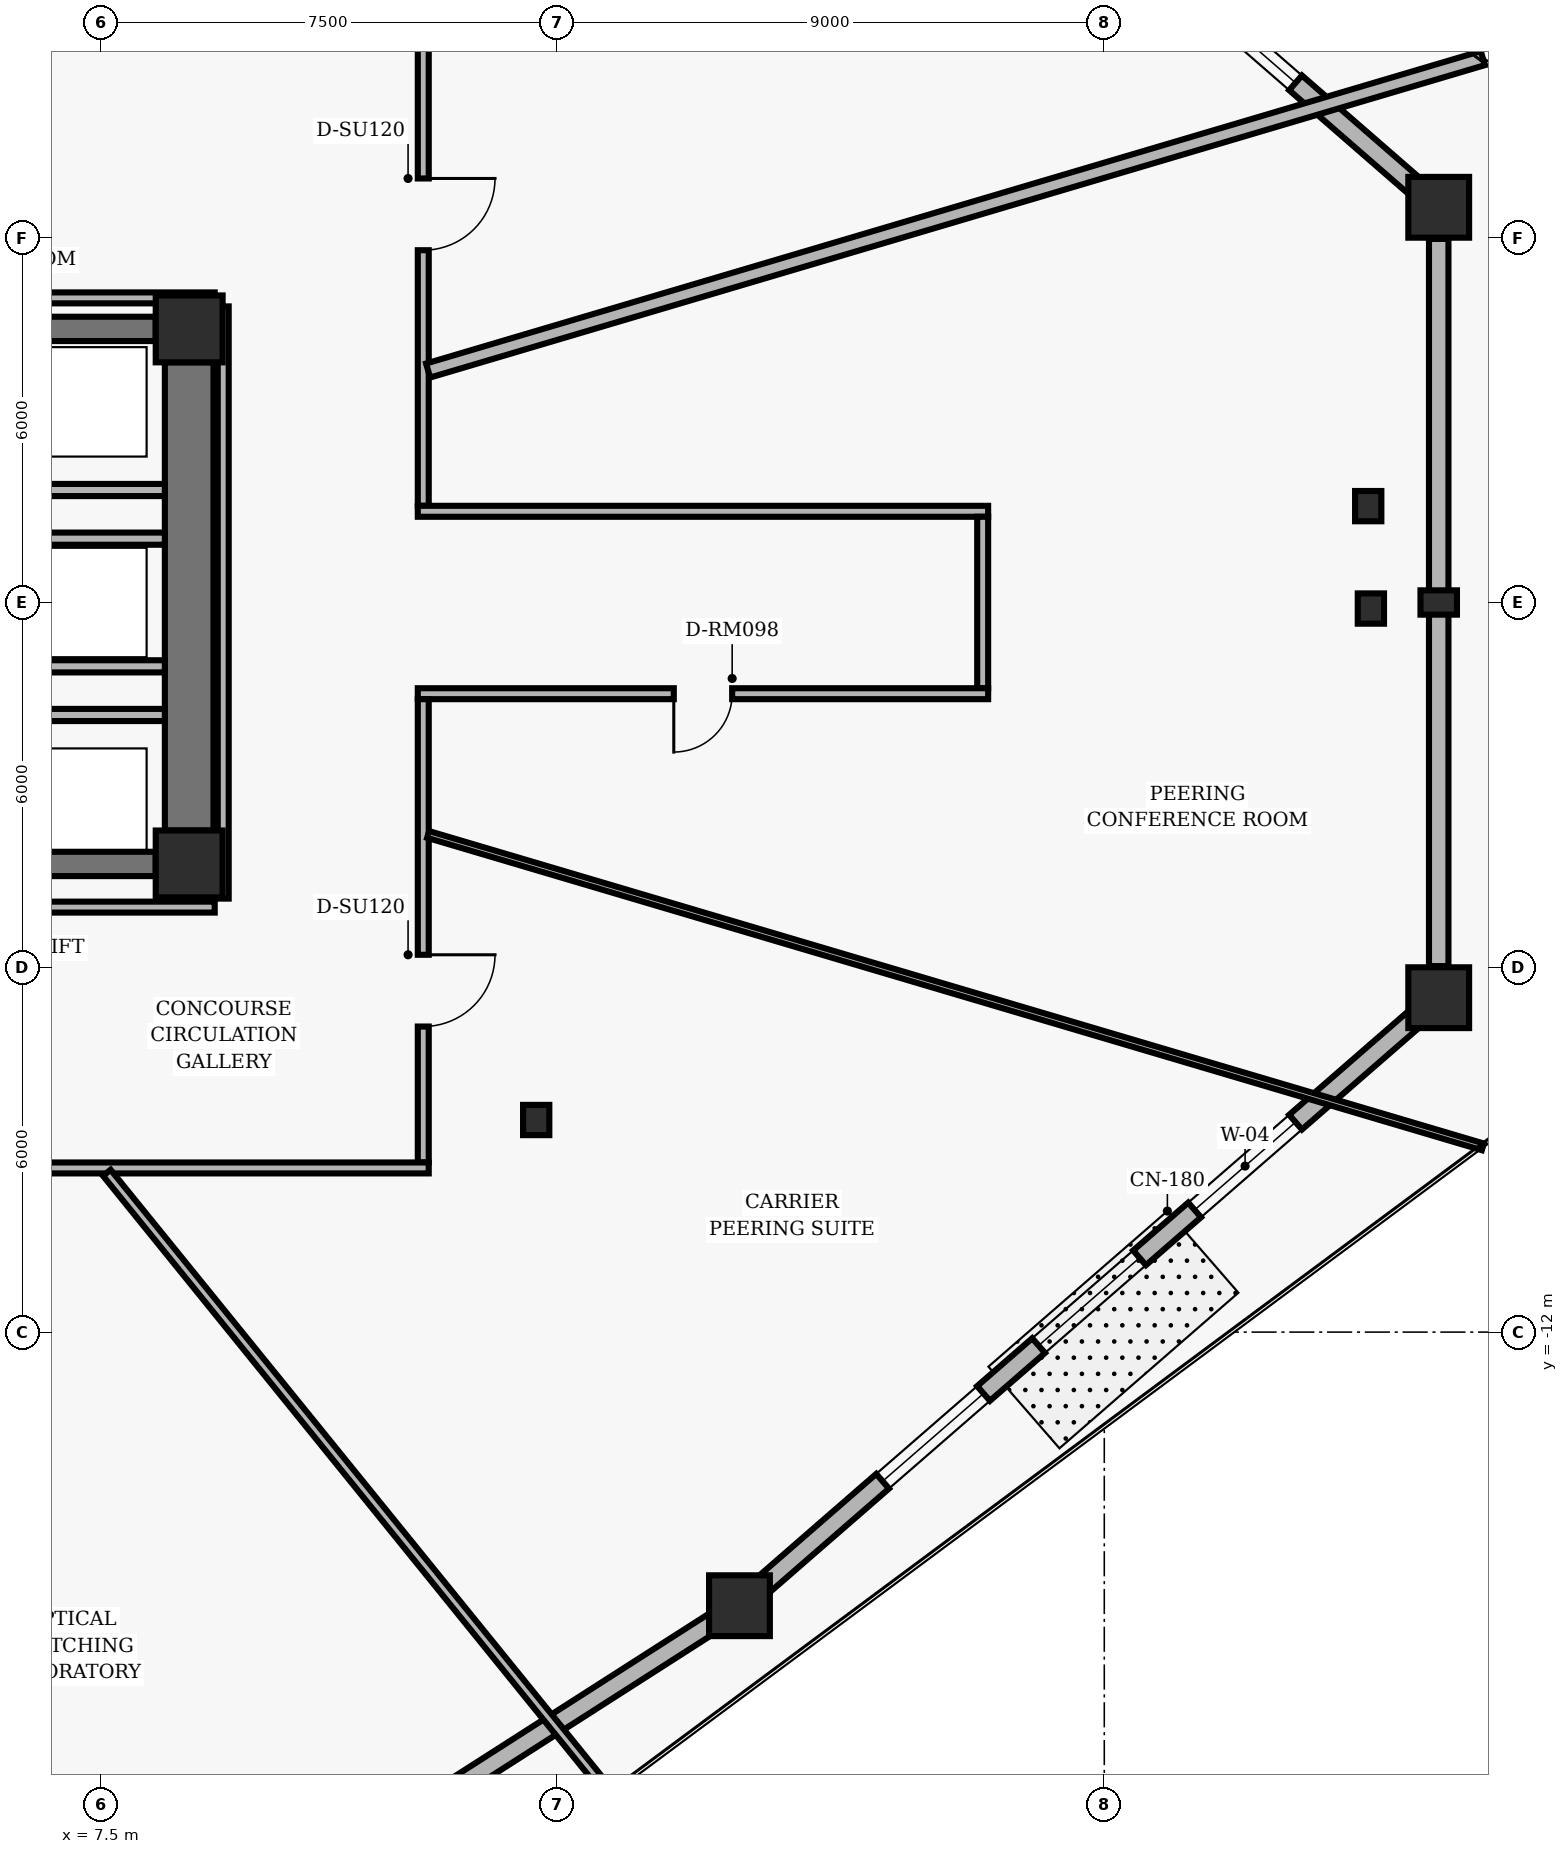
"""IFC4 building model, lengths in metres.
Left out: names, types, materials, properties, quantities, classifications, styles, units other than length and angle.
Written with IfcOpenShell. Run it as: python <this file> out.ifc"""

import sys

from ifc_helpers import new_model, si_unit, direction, frame, frame_2d, origin, origin_2d, place, context, subcontext, project, spatial, rectangle, hollow_rectangle, i_section, extrude, element, fill, save


model = new_model("IFC4")
c1 = context("Model", 3, precision=1e-05, world=origin(), true_north=direction((0.0, 1.0)))
c2 = subcontext(c1, "Body", "Model", "MODEL_VIEW")
j1 = project(units=[si_unit("LENGTHUNIT", "METRE"), si_unit("PLANEANGLEUNIT", "RADIAN")], contexts=[c1])
p1 = place(None, origin())
s1 = spatial("IfcSite", under=j1, at=p1, CompositionType="ELEMENT")
p2 = place(p1, origin())
s2 = spatial("IfcBuilding", under=s1, at=p2, CompositionType="ELEMENT")
p3 = place(p2, frame((0.0, 0.0, 4.8)))
s3 = spatial("IfcBuildingStorey", under=s2, at=p3, CompositionType="ELEMENT", Elevation=4.8)
for number, where, z_axis, x_axis in (
    (1, (8.95, 4.5, 0.0), (0.0, 0.0, 1.0), (1.0, 0.0, 0.0)),
    (2, (8.95, -4.3, 0.0), (0.0, 0.0, 1.0), (1.0, 0.0, 0.0)),
):
    element("IfcColumn", number, at=place(p3, frame(where, z_axis=z_axis, x_axis=x_axis)), inside=s3, PredefinedType="COLUMN", context=c2, shape_type="SweptSolid", body=[
        extrude(hollow_rectangle(XDim=1.1, YDim=1.1, WallThickness=0.07, InnerFilletRadius=0.02, OuterFilletRadius=0.04, at=origin_2d()), origin(), (0.0, 0.0, 1.0), 3.52),
    ])
p4 = place(p3, frame((8.95, -3.75, 0.0), z_axis=(0.0, 0.0, 1.0), x_axis=(0.0, 1.0, 0.0)))
e3 = element("IfcWall", 3, at=p4, inside=s3, PredefinedType="SHEAR", context=c2, shape_type="SweptSolid", body=[
    extrude(rectangle(XDim=7.7, YDim=0.8, at=frame_2d((3.85, 0.0))), origin(), (0.0, 0.0, 1.0), 3.218),
])
for number, where, z_axis, x_axis in (
    (4, (6.6, 4.5, 0.0), (0.0, 0.0, 1.0), (1.0, 0.0, 0.0)),
    (5, (6.6, -4.3, 0.0), (0.0, 0.0, 1.0), (1.0, 0.0, 0.0)),
):
    element("IfcWall", number, at=place(p3, frame(where, z_axis=z_axis, x_axis=x_axis)), inside=s3, PredefinedType="SHEAR", context=c2, shape_type="SweptSolid", body=[
        extrude(rectangle(XDim=1.8, YDim=0.4, at=frame_2d((0.9, 0.0))), origin(), (0.0, 0.0, 1.0), 3.218),
    ])
for number, where, z_axis, x_axis in (
    (6, (18.0, -16.5, 0.0), (0.0, 0.0, 1.0), (1.0, 0.0, 0.0)),
    (7, (29.5, -6.5, 0.0), (0.0, 0.0, 1.0), (1.0, 0.0, 0.0)),
    (8, (29.5, 6.5, 0.0), (0.0, 0.0, 1.0), (1.0, 0.0, 0.0)),
):
    element("IfcColumn", number, at=place(p3, frame(where, z_axis=z_axis, x_axis=x_axis)), inside=s3, PredefinedType="COLUMN", context=c2, shape_type="SweptSolid", body=[
        extrude(rectangle(XDim=1.0, YDim=1.0, at=origin_2d()), origin(), (0.0, 0.0, 1.0), 3.52),
    ])
for number, where, z_axis, x_axis in (
    (9, (28.341, 1.585, 0.0), (0.0, 0.0, 1.0), (1.0, 0.0, 0.0)),
    (10, (14.657, -8.512, 0.0), (0.0, 0.0, 1.0), (1.0, 0.0, 0.0)),
    (11, (28.385, -0.1, 0.0), (0.0, 0.0, 1.0), (1.0, 0.0, 0.0)),
):
    element("IfcColumn", number, at=place(p3, frame(where, z_axis=z_axis, x_axis=x_axis)), inside=s3, PredefinedType="COLUMN", context=c2, shape_type="SweptSolid", body=[
        extrude(i_section(OverallWidth=0.432, OverallDepth=0.498, WebThickness=0.056, FlangeThickness=0.089, FilletRadius=0.025, at=origin_2d()), origin(), (0.0, 0.0, 1.0), 3.52),
    ])
p5 = place(p3, frame((29.5, 0.0, 0.0), z_axis=(0.0, 0.0, 1.0), x_axis=(1.0, 0.0, 0.0)))
e12 = element("IfcColumn", 12, at=p5, inside=s3, PredefinedType="PILASTER", context=c2, shape_type="SweptSolid", body=[
    extrude(rectangle(XDim=0.6, YDim=0.4, at=origin_2d()), origin(), (0.0, 0.0, 1.0), 3.52),
])
p6 = place(p3, frame((17.562, -16.78, 0.0), z_axis=(0.0, 0.0, 1.0), x_axis=(-0.842268830443, -0.539057712368, 0.0)))
e13 = element("IfcWall", 13, at=p6, inside=s3, PredefinedType="SOLIDWALL", context=c2, shape_type="SweptSolid", body=[
    extrude(rectangle(XDim=13.801, YDim=0.32, at=frame_2d((6.9, 0.0))), origin(), (0.0, 0.0, 1.0), 2.588),
])
p7 = place(p3, frame((29.108, -6.841, 0.0), z_axis=(0.0, 0.0, 1.0), x_axis=(-0.754615886195, -0.656166796098, 0.0)))
e14 = element("IfcWall", 14, at=p7, inside=s3, PredefinedType="SOLIDWALL", context=c2, shape_type="SweptSolid", body=[
    extrude(rectangle(XDim=14.2, YDim=0.32, at=frame_2d((7.1, 0.0))), origin(), (0.0, 0.0, 1.0), 2.261),
])
p8 = place(p7, frame((2.6, 0.0, 0.4)))
e15 = element("IfcOpeningElement", 15, at=p8, cuts=e14, PredefinedType="OPENING", context=c2, shape_type="SweptSolid", body=[
    extrude(rectangle(XDim=2.2, YDim=1.1, at=frame_2d((1.1, 0.55))), frame((0.0, 0.17, 0.0), z_axis=(0.0, -1.0, 0.0), x_axis=(1.0, 0.0, 0.0)), (0.0, 0.0, 1.0), 0.34),
])
p9 = place(p7, frame((6.0, 0.0, 0.4)))
e16 = element("IfcOpeningElement", 16, at=p9, cuts=e14, PredefinedType="OPENING", context=c2, shape_type="SweptSolid", body=[
    extrude(rectangle(XDim=2.2, YDim=1.1, at=frame_2d((1.1, 0.55))), frame((0.0, 0.17, 0.0), z_axis=(0.0, -1.0, 0.0), x_axis=(1.0, 0.0, 0.0)), (0.0, 0.0, 1.0), 0.34),
])
p10 = place(p7, frame((9.4, 0.0, 0.4)))
e17 = element("IfcOpeningElement", 17, at=p10, cuts=e14, PredefinedType="OPENING", context=c2, shape_type="SweptSolid", body=[
    extrude(rectangle(XDim=2.2, YDim=1.1, at=frame_2d((1.1, 0.55))), frame((0.0, 0.17, 0.0), z_axis=(0.0, -1.0, 0.0), x_axis=(1.0, 0.0, 0.0)), (0.0, 0.0, 1.0), 0.34),
])
p11 = place(p3, frame((29.5, 5.98, 0.0), z_axis=(0.0, 0.0, 1.0), x_axis=(0.0, -1.0, 0.0)))
e18 = element("IfcWall", 18, at=p11, inside=s3, PredefinedType="SOLIDWALL", context=c2, shape_type="SweptSolid", body=[
    extrude(rectangle(XDim=11.96, YDim=0.32, at=frame_2d((5.98, 0.0))), origin(), (0.0, 0.0, 1.0), 2.588),
])
p12 = place(p3, frame((18.392, 16.159, 0.0), z_axis=(0.0, 0.0, 1.0), x_axis=(0.754615886195, -0.656166796098, 0.0)))
e19 = element("IfcWall", 19, at=p12, inside=s3, PredefinedType="SOLIDWALL", context=c2, shape_type="SweptSolid", body=[
    extrude(rectangle(XDim=14.2, YDim=0.32, at=frame_2d((7.1, 0.0))), origin(), (0.0, 0.0, 1.0), 2.261),
])
p13 = place(p12, frame((2.6, 0.0, 0.4)))
e20 = element("IfcOpeningElement", 20, at=p13, cuts=e19, PredefinedType="OPENING", context=c2, shape_type="SweptSolid", body=[
    extrude(rectangle(XDim=2.2, YDim=1.1, at=frame_2d((1.1, 0.55))), frame((0.0, 0.17, 0.0), z_axis=(0.0, -1.0, 0.0), x_axis=(1.0, 0.0, 0.0)), (0.0, 0.0, 1.0), 0.34),
])
p14 = place(p12, frame((9.4, 0.0, 0.4)))
e21 = element("IfcOpeningElement", 21, at=p14, cuts=e19, PredefinedType="OPENING", context=c2, shape_type="SweptSolid", body=[
    extrude(rectangle(XDim=2.2, YDim=1.1, at=frame_2d((1.1, 0.55))), frame((0.0, 0.17, 0.0), z_axis=(0.0, -1.0, 0.0), x_axis=(1.0, 0.0, 0.0)), (0.0, 0.0, 1.0), 0.34),
])
for number, where, z_axis, x_axis in (
    (22, (6.45, -1.85, 0.0), (0.0, 0.0, 1.0), (1.0, 0.0, 0.0)),
    (23, (6.45, 1.85, 0.0), (0.0, 0.0, 1.0), (1.0, 0.0, 0.0)),
):
    element("IfcWall", number, at=place(p3, frame(where, z_axis=z_axis, x_axis=x_axis)), inside=s3, PredefinedType="PARTITIONING", context=c2, shape_type="SweptSolid", body=[
        extrude(rectangle(XDim=2.1, YDim=0.2, at=frame_2d((1.05, 0.0))), origin(), (0.0, 0.0, 1.0), 3.193),
    ])
for number, where, z_axis, x_axis in (
    (24, (6.64, -1.05, 0.0), (0.0, 0.0, 1.0), (1.0, 0.0, 0.0)),
    (25, (6.64, 1.05, 0.0), (0.0, 0.0, 1.0), (1.0, 0.0, 0.0)),
):
    element("IfcWall", number, at=place(p3, frame(where, z_axis=z_axis, x_axis=x_axis)), inside=s3, PredefinedType="PARTITIONING", context=c2, shape_type="SweptSolid", body=[
        extrude(rectangle(XDim=1.91, YDim=0.2, at=frame_2d((0.955, 0.0))), origin(), (0.0, 0.0, 1.0), 3.193),
    ])
p15 = place(p3, frame((12.8, 9.21, 0.0), z_axis=(0.0, 0.0, 1.0), x_axis=(0.0, -1.0, 0.0)))
e26 = element("IfcWall", 26, at=p15, inside=s3, PredefinedType="PARTITIONING", context=c2, shape_type="SweptSolid", body=[
    extrude(rectangle(XDim=7.62, YDim=0.18, at=frame_2d((3.81, 0.0))), origin(), (0.0, 0.0, 1.0), 3.193),
])
p16 = place(p15, frame((2.236, 0.0, 0.0)))
e27 = element("IfcOpeningElement", 27, at=p16, cuts=e26, PredefinedType="OPENING", context=c2, shape_type="SweptSolid", body=[
    extrude(rectangle(XDim=1.18, YDim=2.02, at=frame_2d((0.59, 1.01))), frame((0.0, 0.1, 0.0), z_axis=(0.0, -1.0, 0.0), x_axis=(1.0, 0.0, 0.0)), (0.0, 0.0, 1.0), 0.2),
])
p17 = place(p3, frame((12.71, 1.5, 0.0), z_axis=(0.0, 0.0, 1.0), x_axis=(1.0, 0.0, 0.0)))
e28 = element("IfcWall", 28, at=p17, inside=s3, PredefinedType="PARTITIONING", context=c2, shape_type="SweptSolid", body=[
    extrude(rectangle(XDim=9.38, YDim=0.18, at=frame_2d((4.69, 0.0))), origin(), (0.0, 0.0, 1.0), 3.193),
])
p18 = place(p3, frame((22.0, 1.41, 0.0), z_axis=(0.0, 0.0, 1.0), x_axis=(0.0, -1.0, 0.0)))
e29 = element("IfcWall", 29, at=p18, inside=s3, PredefinedType="PARTITIONING", context=c2, shape_type="SweptSolid", body=[
    extrude(rectangle(XDim=2.82, YDim=0.18, at=frame_2d((1.41, 0.0))), origin(), (0.0, 0.0, 1.0), 3.193),
])
p19 = place(p3, frame((22.09, -1.5, 0.0), z_axis=(0.0, 0.0, 1.0), x_axis=(-1.0, 0.0, 0.0)))
e30 = element("IfcWall", 30, at=p19, inside=s3, PredefinedType="PARTITIONING", context=c2, shape_type="SweptSolid", body=[
    extrude(rectangle(XDim=9.38, YDim=0.18, at=frame_2d((4.69, 0.0))), origin(), (0.0, 0.0, 1.0), 3.193),
])
p20 = place(p19, frame((4.21, 0.0, 0.0)))
e31 = element("IfcOpeningElement", 31, at=p20, cuts=e30, PredefinedType="OPENING", context=c2, shape_type="SweptSolid", body=[
    extrude(rectangle(XDim=0.96, YDim=2.02, at=frame_2d((0.48, 1.01))), frame((0.0, 0.1, 0.0), z_axis=(0.0, -1.0, 0.0), x_axis=(1.0, 0.0, 0.0)), (0.0, 0.0, 1.0), 0.2),
])
p21 = place(p3, frame((12.8, -1.59, 0.0), z_axis=(0.0, 0.0, 1.0), x_axis=(0.0, -1.0, 0.0)))
e32 = element("IfcWall", 32, at=p21, inside=s3, PredefinedType="PARTITIONING", context=c2, shape_type="SweptSolid", body=[
    extrude(rectangle(XDim=7.62, YDim=0.18, at=frame_2d((3.81, 0.0))), origin(), (0.0, 0.0, 1.0), 3.193),
])
p22 = place(p21, frame((4.204, 0.0, 0.0)))
e33 = element("IfcOpeningElement", 33, at=p22, cuts=e32, PredefinedType="OPENING", context=c2, shape_type="SweptSolid", body=[
    extrude(rectangle(XDim=1.18, YDim=2.02, at=frame_2d((0.59, 1.01))), frame((0.0, 0.1, 0.0), z_axis=(0.0, -1.0, 0.0), x_axis=(1.0, 0.0, 0.0)), (0.0, 0.0, 1.0), 0.2),
])
p23 = place(p3, frame((12.89, -9.3, 0.0), z_axis=(0.0, 0.0, 1.0), x_axis=(-1.0, 0.0, 0.0)))
e34 = element("IfcWall", 34, at=p23, inside=s3, PredefinedType="PARTITIONING", context=c2, shape_type="SweptSolid", body=[
    extrude(rectangle(XDim=25.78, YDim=0.18, at=frame_2d((12.89, 0.0))), origin(), (0.0, 0.0, 1.0), 2.76),
])
p24 = place(p23, frame((21.167, 0.0, 0.0)))
e35 = element("IfcOpeningElement", 35, at=p24, cuts=e34, PredefinedType="OPENING", context=c2, shape_type="SweptSolid", body=[
    extrude(rectangle(XDim=1.18, YDim=2.02, at=frame_2d((0.59, 1.01))), frame((0.0, 0.1, 0.0), z_axis=(0.0, -1.0, 0.0), x_axis=(1.0, 0.0, 0.0)), (0.0, 0.0, 1.0), 0.2),
])
p25 = place(p23, frame((14.507, 0.0, 0.0)))
e36 = element("IfcOpeningElement", 36, at=p25, cuts=e34, PredefinedType="OPENING", context=c2, shape_type="SweptSolid", body=[
    extrude(rectangle(XDim=0.96, YDim=2.02, at=frame_2d((0.48, 1.01))), frame((0.0, 0.1, 0.0), z_axis=(0.0, -1.0, 0.0), x_axis=(1.0, 0.0, 0.0)), (0.0, 0.0, 1.0), 0.2),
])
p26 = place(p23, frame((8.119, 0.0, 0.0)))
e37 = element("IfcOpeningElement", 37, at=p26, cuts=e34, PredefinedType="OPENING", context=c2, shape_type="SweptSolid", body=[
    extrude(rectangle(XDim=1.02, YDim=2.02, at=frame_2d((0.51, 1.01))), frame((0.0, 0.1, 0.0), z_axis=(0.0, -1.0, 0.0), x_axis=(1.0, 0.0, 0.0)), (0.0, 0.0, 1.0), 0.2),
])
p27 = place(p3, frame((6.03, -5.01, 0.0), z_axis=(0.0, 0.0, 1.0), x_axis=(1.0, 0.0, 0.0)))
e38 = element("IfcWall", 38, at=p27, inside=s3, PredefinedType="PARTITIONING", context=c2, shape_type="SweptSolid", body=[
    extrude(rectangle(XDim=3.34, YDim=0.18, at=frame_2d((1.67, 0.0))), origin(), (0.0, 0.0, 1.0), 3.193),
])
p28 = place(p3, frame((9.51, -4.87, 0.0), z_axis=(0.0, 0.0, 1.0), x_axis=(0.0, 1.0, 0.0)))
e39 = element("IfcWall", 39, at=p28, inside=s3, PredefinedType="PARTITIONING", context=c2, shape_type="SweptSolid", body=[
    extrude(rectangle(XDim=9.74, YDim=0.18, at=frame_2d((4.87, 0.0))), origin(), (0.0, 0.0, 1.0), 3.193),
])
p29 = place(p3, frame((9.37, 5.01, 0.0), z_axis=(0.0, 0.0, 1.0), x_axis=(-1.0, 0.0, 0.0)))
e40 = element("IfcWall", 40, at=p29, inside=s3, PredefinedType="PARTITIONING", context=c2, shape_type="SweptSolid", body=[
    extrude(rectangle(XDim=2.808, YDim=0.18, at=frame_2d((1.404, 0.0))), origin(), (0.0, 0.0, 1.0), 3.193),
])
p30 = place(p3, frame((7.596, -9.38, 0.0), z_axis=(0.0, 0.0, 1.0), x_axis=(0.62932258483, -0.777144184964, 0.0)))
e41 = element("IfcWall", 41, at=p30, inside=s3, PredefinedType="PARTITIONING", context=c2, shape_type="SweptSolid", body=[
    extrude(rectangle(XDim=13.158, YDim=0.16, at=frame_2d((6.579, 0.0))), origin(), (0.0, 0.0, 1.0), 3.193),
])
p31 = place(p3, frame((12.88, -3.815, 0.0), z_axis=(0.0, 0.0, 1.0), x_axis=(0.958821118113, -0.284010674906, 0.0)))
e42 = element("IfcWall", 42, at=p31, inside=s3, PredefinedType="MOVABLE", context=c2, shape_type="SweptSolid", body=[
    extrude(rectangle(XDim=18.091, YDim=0.115, at=frame_2d((9.045, 0.0))), origin(), (0.0, 0.0, 1.0), 2.246),
])
p32 = place(p3, frame((12.88, 3.815, 0.0), z_axis=(0.0, 0.0, 1.0), x_axis=(0.958821118113, 0.284010674906, 0.0)))
e43 = element("IfcWall", 43, at=p32, inside=s3, PredefinedType="PARTITIONING", context=c2, shape_type="SweptSolid", body=[
    extrude(rectangle(XDim=18.091, YDim=0.24, at=frame_2d((9.045, 0.0))), origin(), (0.0, 0.0, 1.0), 2.246),
])
p33 = place(p8, origin())
e44 = element("IfcWindow", 44, at=p33, inside=s3, PartitioningType="SINGLE_PANEL", PredefinedType="WINDOW", context=c2, shape_type="SweptSolid", body=[
    extrude(rectangle(XDim=2.2, YDim=1.1, at=frame_2d((1.1, 0.55))), frame((0.0, 0.03, 0.0), z_axis=(0.0, -1.0, 0.0), x_axis=(1.0, 0.0, 0.0)), (0.0, 0.0, 1.0), 0.06),
])
fill(e15, e44)
p34 = place(p9, origin())
e45 = element("IfcWindow", 45, at=p34, inside=s3, PartitioningType="SINGLE_PANEL", PredefinedType="WINDOW", context=c2, shape_type="SweptSolid", body=[
    extrude(rectangle(XDim=2.2, YDim=1.1, at=frame_2d((1.1, 0.55))), frame((0.0, 0.03, 0.0), z_axis=(0.0, -1.0, 0.0), x_axis=(1.0, 0.0, 0.0)), (0.0, 0.0, 1.0), 0.06),
])
fill(e16, e45)
p35 = place(p10, origin())
e46 = element("IfcWindow", 46, at=p35, inside=s3, PartitioningType="SINGLE_PANEL", PredefinedType="WINDOW", context=c2, shape_type="SweptSolid", body=[
    extrude(rectangle(XDim=2.2, YDim=1.1, at=frame_2d((1.1, 0.55))), frame((0.0, 0.03, 0.0), z_axis=(0.0, -1.0, 0.0), x_axis=(1.0, 0.0, 0.0)), (0.0, 0.0, 1.0), 0.06),
])
fill(e17, e46)
p36 = place(p14, origin())
e47 = element("IfcWindow", 47, at=p36, inside=s3, PartitioningType="SINGLE_PANEL", PredefinedType="WINDOW", context=c2, shape_type="SweptSolid", body=[
    extrude(rectangle(XDim=2.2, YDim=1.1, at=frame_2d((1.1, 0.55))), frame((0.0, 0.03, 0.0), z_axis=(0.0, -1.0, 0.0), x_axis=(1.0, 0.0, 0.0)), (0.0, 0.0, 1.0), 0.06),
])
fill(e21, e47)
p37 = place(p22, origin())
e48 = element("IfcDoor", 48, at=p37, inside=s3, OperationType="SINGLE_SWING_LEFT", PredefinedType="DOOR", context=c2, shape_type="SweptSolid", body=[
    extrude(rectangle(XDim=1.18, YDim=2.02, at=frame_2d((0.59, 1.01))), frame((0.0, 0.025, 0.0), z_axis=(0.0, -1.0, 0.0), x_axis=(1.0, 0.0, 0.0)), (0.0, 0.0, 1.0), 0.05),
])
fill(e33, e48)
p38 = place(p20, origin())
e49 = element("IfcDoor", 49, at=p38, inside=s3, OperationType="SINGLE_SWING_RIGHT", PredefinedType="DOOR", context=c2, shape_type="SweptSolid", body=[
    extrude(rectangle(XDim=0.96, YDim=2.02, at=frame_2d((0.48, 1.01))), frame((0.0, 0.025, 0.0), z_axis=(0.0, -1.0, 0.0), x_axis=(1.0, 0.0, 0.0)), (0.0, 0.0, 1.0), 0.05),
])
fill(e31, e49)
p39 = place(p16, origin())
e50 = element("IfcDoor", 50, at=p39, inside=s3, OperationType="SINGLE_SWING_LEFT", PredefinedType="DOOR", context=c2, shape_type="SweptSolid", body=[
    extrude(rectangle(XDim=1.18, YDim=2.02, at=frame_2d((0.59, 1.01))), frame((0.0, 0.025, 0.0), z_axis=(0.0, -1.0, 0.0), x_axis=(1.0, 0.0, 0.0)), (0.0, 0.0, 1.0), 0.05),
])
fill(e27, e50)
save(model, sys.argv[1])
